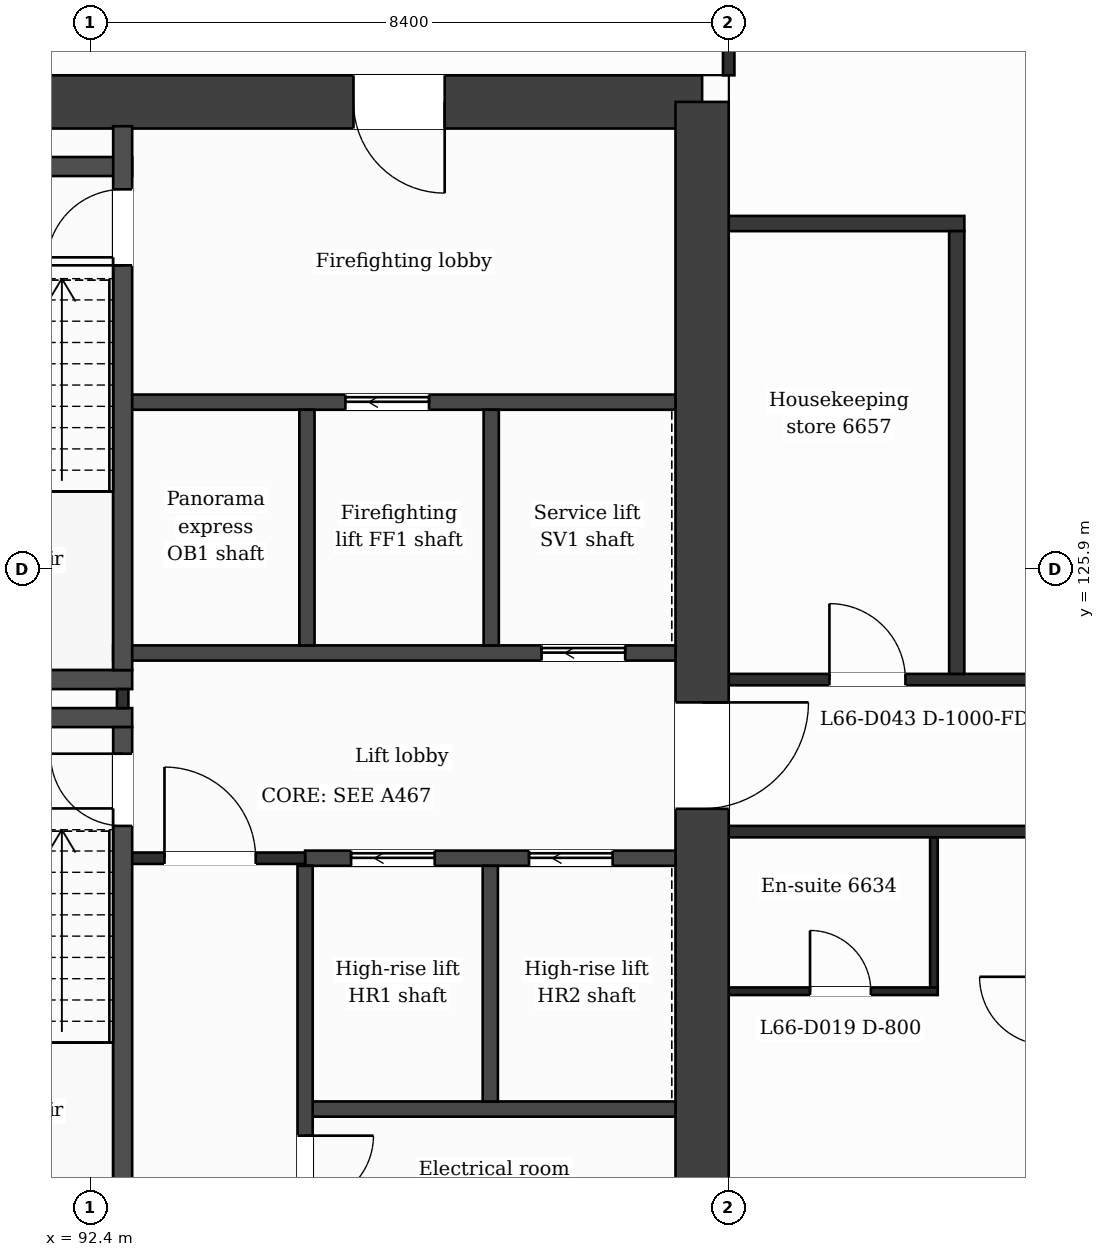
"""IFC4 building model, lengths in metres.
Left out: names, types, materials, properties, quantities, classifications, styles, units other than length and angle.
Written with IfcOpenShell. Run it as: python <this file> out.ifc"""

import sys

from ifc_helpers import new_model, si_unit, direction, frame, frame_2d, origin, place, context, subcontext, project, spatial, rectangle, extrude, element, fill, save


model = new_model("IFC4")
c1 = context("Model", 3, precision=1e-05, world=origin(), true_north=direction((0.0, 1.0)))
c2 = subcontext(c1, "Body", "Model", "MODEL_VIEW")
j1 = project(units=[si_unit("LENGTHUNIT", "METRE"), si_unit("PLANEANGLEUNIT", "RADIAN")], contexts=[c1])
p1 = place(None, origin())
s1 = spatial("IfcSite", under=j1, at=p1, CompositionType="ELEMENT")
p2 = place(p1, origin())
s2 = spatial("IfcBuilding", under=s1, at=p2, CompositionType="ELEMENT")
p3 = place(p2, frame((0.0, 0.0, 273.8)))
s3 = spatial("IfcBuildingStorey", under=s2, at=p3, CompositionType="ELEMENT", Elevation=273.8)
p4 = place(p3, frame((88.937, 132.05, 0.0), z_axis=(0.0, 0.0, 1.0), x_axis=(1.0, 0.0, 0.0)))
e1 = element("IfcWall", 1, at=p4, inside=s3, PredefinedType="SHEAR", context=c2, shape_type="SweptSolid", body=[
    extrude(rectangle(XDim=11.513, YDim=0.7, at=frame_2d((5.757, 0.0))), origin(), (0.0, 0.0, 1.0), 3.7),
])
p5 = place(p4, frame((6.927, 0.0, 0.0)))
e2 = element("IfcOpeningElement", 2, at=p5, cuts=e1, PredefinedType="OPENING", context=c2, shape_type="SweptSolid", body=[
    extrude(rectangle(XDim=1.2, YDim=2.1, at=frame_2d((0.6, 1.05))), frame((0.0, 0.36, 0.0), z_axis=(0.0, -1.0, 0.0), x_axis=(1.0, 0.0, 0.0)), (0.0, 0.0, 1.0), 0.72),
])
p6 = place(p3, frame((100.45, 132.05, 0.0), z_axis=(0.0, 0.0, 1.0), x_axis=(0.0, -1.0, 0.0)))
e3 = element("IfcWall", 3, at=p6, inside=s3, PredefinedType="SHEAR", context=c2, shape_type="SweptSolid", body=[
    extrude(rectangle(XDim=21.3, YDim=0.7, at=frame_2d((10.65, 0.0))), origin(), (0.0, 0.0, 1.0), 3.7),
])
p7 = place(p6, frame((7.9, 0.0, 0.0)))
e4 = element("IfcOpeningElement", 4, at=p7, cuts=e3, PredefinedType="OPENING", context=c2, shape_type="SweptSolid", body=[
    extrude(rectangle(XDim=1.4, YDim=2.1, at=frame_2d((0.7, 1.05))), frame((0.0, 0.36, 0.0), z_axis=(0.0, -1.0, 0.0), x_axis=(1.0, 0.0, 0.0)), (0.0, 0.0, 1.0), 0.72),
])
p8 = place(p3, frame((95.227, 118.8, 0.0), z_axis=(0.0, 0.0, 1.0), x_axis=(1.0, 0.0, 0.0)))
e5 = element("IfcWall", 5, at=p8, inside=s3, PredefinedType="PARTITIONING", context=c2, shape_type="SweptSolid", body=[
    extrude(rectangle(XDim=4.873, YDim=0.2, at=frame_2d((2.437, 0.0))), origin(), (0.0, 0.0, 1.0), 3.38),
])
p9 = place(p3, frame((100.8, 120.35, 0.0), z_axis=(0.0, 0.0, 1.0), x_axis=(1.0, 0.0, 0.0)))
e6 = element("IfcWall", 6, at=p9, inside=s3, PredefinedType="PARTITIONING", context=c2, shape_type="SweptSolid", body=[
    extrude(rectangle(XDim=2.75, YDim=0.1, at=frame_2d((1.375, 0.0))), origin(), (0.0, 0.0, 1.0), 3.38),
])
p10 = place(p9, frame((1.07, 0.0, 0.0)))
e7 = element("IfcOpeningElement", 7, at=p10, cuts=e6, PredefinedType="OPENING", context=c2, shape_type="SweptSolid", body=[
    extrude(rectangle(XDim=0.8, YDim=2.1, at=frame_2d((0.4, 1.05))), frame((0.0, 0.06, 0.0), z_axis=(0.0, -1.0, 0.0), x_axis=(1.0, 0.0, 0.0)), (0.0, 0.0, 1.0), 0.12),
])
p11 = place(p3, frame((95.227, 122.1, 0.0), z_axis=(0.0, 0.0, 1.0), x_axis=(1.0, 0.0, 0.0)))
e8 = element("IfcWall", 8, at=p11, inside=s3, PredefinedType="PARTITIONING", context=c2, shape_type="SweptSolid", body=[
    extrude(rectangle(XDim=4.873, YDim=0.2, at=frame_2d((2.437, 0.0))), origin(), (0.0, 0.0, 1.0), 3.38),
])
p12 = place(p11, frame((0.605, 0.0, 0.0)))
e9 = element("IfcOpeningElement", 9, at=p12, cuts=e8, PredefinedType="OPENING", context=c2, shape_type="SweptSolid", body=[
    extrude(rectangle(XDim=1.1, YDim=2.1, at=frame_2d((0.55, 1.05))), frame((0.0, 0.11, 0.0), z_axis=(0.0, -1.0, 0.0), x_axis=(1.0, 0.0, 0.0)), (0.0, 0.0, 1.0), 0.22),
])
p13 = place(p11, frame((2.946, 0.0, 0.0)))
e10 = element("IfcOpeningElement", 10, at=p13, cuts=e8, PredefinedType="OPENING", context=c2, shape_type="SweptSolid", body=[
    extrude(rectangle(XDim=1.1, YDim=2.1, at=frame_2d((0.55, 1.05))), frame((0.0, 0.11, 0.0), z_axis=(0.0, -1.0, 0.0), x_axis=(1.0, 0.0, 0.0)), (0.0, 0.0, 1.0), 0.22),
])
p14 = place(p3, frame((92.827, 122.1, 0.0), z_axis=(0.0, 0.0, 1.0), x_axis=(1.0, 0.0, 0.0)))
e11 = element("IfcWall", 11, at=p14, inside=s3, PredefinedType="PARTITIONING", context=c2, shape_type="SweptSolid", body=[
    extrude(rectangle(XDim=2.4, YDim=0.15, at=frame_2d((1.2, 0.0))), origin(), (0.0, 0.0, 1.0), 3.38),
])
p15 = place(p14, frame((0.55, 0.0, 0.0)))
e12 = element("IfcOpeningElement", 12, at=p15, cuts=e11, PredefinedType="OPENING", context=c2, shape_type="SweptSolid", body=[
    extrude(rectangle(XDim=1.2, YDim=2.1, at=frame_2d((0.6, 1.05))), frame((0.0, 0.085, 0.0), z_axis=(0.0, -1.0, 0.0), x_axis=(1.0, 0.0, 0.0)), (0.0, 0.0, 1.0), 0.17),
])
p16 = place(p3, frame((100.8, 122.45, 0.0), z_axis=(0.0, 0.0, 1.0), x_axis=(1.0, 0.0, 0.0)))
e13 = element("IfcWall", 13, at=p16, inside=s3, PredefinedType="PARTITIONING", context=c2, shape_type="SweptSolid", body=[
    extrude(rectangle(XDim=25.2, YDim=0.15, at=frame_2d((12.6, 0.0))), origin(), (0.0, 0.0, 1.0), 3.38),
])
p17 = place(p16, frame((5.55, 0.0, 0.0)))
e14 = element("IfcOpeningElement", 14, at=p17, cuts=e13, PredefinedType="OPENING", context=c2, shape_type="SweptSolid", body=[
    extrude(rectangle(XDim=1.0, YDim=2.1, at=frame_2d((0.5, 1.05))), frame((0.0, 0.085, 0.0), z_axis=(0.0, -1.0, 0.0), x_axis=(1.0, 0.0, 0.0)), (0.0, 0.0, 1.0), 0.17),
])
p18 = place(p16, frame((8.862, 0.0, 0.0)))
e15 = element("IfcOpeningElement", 15, at=p18, cuts=e13, PredefinedType="OPENING", context=c2, shape_type="SweptSolid", body=[
    extrude(rectangle(XDim=0.95, YDim=2.1, at=frame_2d((0.475, 1.05))), frame((0.0, 0.085, 0.0), z_axis=(0.0, -1.0, 0.0), x_axis=(1.0, 0.0, 0.0)), (0.0, 0.0, 1.0), 0.17),
])
p19 = place(p16, frame((15.2, 0.0, 0.0)))
e16 = element("IfcOpeningElement", 16, at=p19, cuts=e13, PredefinedType="OPENING", context=c2, shape_type="SweptSolid", body=[
    extrude(rectangle(XDim=0.95, YDim=2.1, at=frame_2d((0.475, 1.05))), frame((0.0, 0.085, 0.0), z_axis=(0.0, -1.0, 0.0), x_axis=(1.0, 0.0, 0.0)), (0.0, 0.0, 1.0), 0.17),
])
p20 = place(p16, frame((17.325, 0.0, 0.0)))
e17 = element("IfcOpeningElement", 17, at=p20, cuts=e13, PredefinedType="OPENING", context=c2, shape_type="SweptSolid", body=[
    extrude(rectangle(XDim=1.0, YDim=2.1, at=frame_2d((0.5, 1.05))), frame((0.0, 0.085, 0.0), z_axis=(0.0, -1.0, 0.0), x_axis=(1.0, 0.0, 0.0)), (0.0, 0.0, 1.0), 0.17),
])
p21 = place(p16, frame((23.862, 0.0, 0.0)))
e18 = element("IfcOpeningElement", 18, at=p21, cuts=e13, PredefinedType="OPENING", context=c2, shape_type="SweptSolid", body=[
    extrude(rectangle(XDim=0.95, YDim=2.1, at=frame_2d((0.475, 1.05))), frame((0.0, 0.085, 0.0), z_axis=(0.0, -1.0, 0.0), x_axis=(1.0, 0.0, 0.0)), (0.0, 0.0, 1.0), 0.17),
])
for number, where, z_axis, x_axis in (
    (19, (89.552, 123.95, 0.0), (0.0, 0.0, 1.0), (1.0, 0.0, 0.0)),
    (20, (89.552, 124.45, 0.0), (0.0, 0.0, 1.0), (1.0, 0.0, 0.0)),
):
    element("IfcWall", number, at=place(p3, frame(where, z_axis=z_axis, x_axis=x_axis)), inside=s3, PredefinedType="PARTITIONING", context=c2, shape_type="SweptSolid", body=[
        extrude(rectangle(XDim=3.4, YDim=0.25, at=frame_2d((1.7, 0.0))), origin(), (0.0, 0.0, 1.0), 3.38),
    ])
p22 = place(p3, frame((100.8, 124.45, 0.0), z_axis=(0.0, 0.0, 1.0), x_axis=(1.0, 0.0, 0.0)))
e21 = element("IfcWall", 21, at=p22, inside=s3, PredefinedType="PARTITIONING", context=c2, shape_type="SweptSolid", body=[
    extrude(rectangle(XDim=25.2, YDim=0.15, at=frame_2d((12.6, 0.0))), origin(), (0.0, 0.0, 1.0), 3.38),
])
p23 = place(p22, frame((6.125, 0.0, 0.0)))
e22 = element("IfcOpeningElement", 22, at=p23, cuts=e21, PredefinedType="OPENING", context=c2, shape_type="SweptSolid", body=[
    extrude(rectangle(XDim=1.0, YDim=2.1, at=frame_2d((0.5, 1.05))), frame((0.0, 0.085, 0.0), z_axis=(0.0, -1.0, 0.0), x_axis=(1.0, 0.0, 0.0)), (0.0, 0.0, 1.0), 0.17),
])
p24 = place(p22, frame((1.325, 0.0, 0.0)))
e23 = element("IfcOpeningElement", 23, at=p24, cuts=e21, PredefinedType="OPENING", context=c2, shape_type="SweptSolid", body=[
    extrude(rectangle(XDim=1.0, YDim=2.1, at=frame_2d((0.5, 1.05))), frame((0.0, 0.085, 0.0), z_axis=(0.0, -1.0, 0.0), x_axis=(1.0, 0.0, 0.0)), (0.0, 0.0, 1.0), 0.17),
])
p25 = place(p22, frame((11.43, 0.0, 0.0)))
e24 = element("IfcOpeningElement", 24, at=p25, cuts=e21, PredefinedType="OPENING", context=c2, shape_type="SweptSolid", body=[
    extrude(rectangle(XDim=1.0, YDim=2.1, at=frame_2d((0.5, 1.05))), frame((0.0, 0.085, 0.0), z_axis=(0.0, -1.0, 0.0), x_axis=(1.0, 0.0, 0.0)), (0.0, 0.0, 1.0), 0.17),
])
p26 = place(p22, frame((21.17, 0.0, 0.0)))
e25 = element("IfcOpeningElement", 25, at=p26, cuts=e21, PredefinedType="OPENING", context=c2, shape_type="SweptSolid", body=[
    extrude(rectangle(XDim=1.0, YDim=2.1, at=frame_2d((0.5, 1.05))), frame((0.0, 0.085, 0.0), z_axis=(0.0, -1.0, 0.0), x_axis=(1.0, 0.0, 0.0)), (0.0, 0.0, 1.0), 0.17),
])
p27 = place(p3, frame((92.702, 124.8, 0.0), z_axis=(0.0, 0.0, 1.0), x_axis=(1.0, 0.0, 0.0)))
e26 = element("IfcWall", 26, at=p27, inside=s3, PredefinedType="PARTITIONING", context=c2, shape_type="SweptSolid", body=[
    extrude(rectangle(XDim=7.398, YDim=0.2, at=frame_2d((3.699, 0.0))), origin(), (0.0, 0.0, 1.0), 3.38),
])
p28 = place(p27, frame((5.636, 0.0, 0.0)))
e27 = element("IfcOpeningElement", 27, at=p28, cuts=e26, PredefinedType="OPENING", context=c2, shape_type="SweptSolid", body=[
    extrude(rectangle(XDim=1.1, YDim=2.1, at=frame_2d((0.55, 1.05))), frame((0.0, 0.11, 0.0), z_axis=(0.0, -1.0, 0.0), x_axis=(1.0, 0.0, 0.0)), (0.0, 0.0, 1.0), 0.22),
])
p29 = place(p3, frame((92.827, 128.1, 0.0), z_axis=(0.0, 0.0, 1.0), x_axis=(1.0, 0.0, 0.0)))
e28 = element("IfcWall", 28, at=p29, inside=s3, PredefinedType="PARTITIONING", context=c2, shape_type="SweptSolid", body=[
    extrude(rectangle(XDim=7.273, YDim=0.2, at=frame_2d((3.637, 0.0))), origin(), (0.0, 0.0, 1.0), 3.38),
])
p30 = place(p29, frame((2.93, 0.0, 0.0)))
e29 = element("IfcOpeningElement", 29, at=p30, cuts=e28, PredefinedType="OPENING", context=c2, shape_type="SweptSolid", body=[
    extrude(rectangle(XDim=1.1, YDim=2.1, at=frame_2d((0.55, 1.05))), frame((0.0, 0.11, 0.0), z_axis=(0.0, -1.0, 0.0), x_axis=(1.0, 0.0, 0.0)), (0.0, 0.0, 1.0), 0.22),
])
p31 = place(p3, frame((100.8, 130.45, 0.0), z_axis=(0.0, 0.0, 1.0), x_axis=(1.0, 0.0, 0.0)))
e30 = element("IfcWall", 30, at=p31, inside=s3, PredefinedType="PARTITIONING", context=c2, shape_type="SweptSolid", body=[
    extrude(rectangle(XDim=3.1, YDim=0.2, at=frame_2d((1.55, 0.0))), origin(), (0.0, 0.0, 1.0), 3.38),
])
p32 = place(p3, frame((89.146, 131.2, 0.0), z_axis=(0.0, 0.0, 1.0), x_axis=(1.0, 0.0, 0.0)))
e31 = element("IfcWall", 31, at=p32, inside=s3, PredefinedType="PARTITIONING", context=c2, shape_type="SweptSolid", body=[
    extrude(rectangle(XDim=3.806, YDim=0.25, at=frame_2d((1.903, 0.0))), origin(), (0.0, 0.0, 1.0), 3.38),
])
p33 = place(p3, frame((92.827, 124.075, 0.0), z_axis=(0.0, 0.0, 1.0), x_axis=(0.0, 1.0, 0.0)))
e32 = element("IfcWall", 32, at=p33, inside=s3, PredefinedType="PARTITIONING", context=c2, shape_type="SweptSolid", body=[
    extrude(rectangle(XDim=0.25, YDim=0.15, at=frame_2d((0.125, 0.0))), origin(), (0.0, 0.0, 1.0), 3.38),
])
p34 = place(p3, frame((92.827, 116.67, 0.0), z_axis=(0.0, 0.0, 1.0), x_axis=(0.0, 1.0, 0.0)))
e33 = element("IfcWall", 33, at=p34, inside=s3, PredefinedType="PARTITIONING", context=c2, shape_type="SweptSolid", body=[
    extrude(rectangle(XDim=7.155, YDim=0.25, at=frame_2d((3.578, 0.0))), origin(), (0.0, 0.0, 1.0), 3.38),
])
p35 = place(p34, frame((5.855, 0.0, 0.0)))
e34 = element("IfcOpeningElement", 34, at=p35, cuts=e33, PredefinedType="OPENING", context=c2, shape_type="SweptSolid", body=[
    extrude(rectangle(XDim=0.95, YDim=2.1, at=frame_2d((0.475, 1.05))), frame((0.0, 0.135, 0.0), z_axis=(0.0, -1.0, 0.0), x_axis=(1.0, 0.0, 0.0)), (0.0, 0.0, 1.0), 0.27),
])
p36 = place(p3, frame((92.827, 124.575, 0.0), z_axis=(0.0, 0.0, 1.0), x_axis=(0.0, 1.0, 0.0)))
e35 = element("IfcWall", 35, at=p36, inside=s3, PredefinedType="PARTITIONING", context=c2, shape_type="SweptSolid", body=[
    extrude(rectangle(XDim=7.155, YDim=0.25, at=frame_2d((3.578, 0.0))), origin(), (0.0, 0.0, 1.0), 3.38),
])
p37 = place(p36, frame((5.325, 0.0, 0.0)))
e36 = element("IfcOpeningElement", 36, at=p37, cuts=e35, PredefinedType="OPENING", context=c2, shape_type="SweptSolid", body=[
    extrude(rectangle(XDim=1.0, YDim=2.1, at=frame_2d((0.5, 1.05))), frame((0.0, 0.135, 0.0), z_axis=(0.0, -1.0, 0.0), x_axis=(1.0, 0.0, 0.0)), (0.0, 0.0, 1.0), 0.27),
])
p38 = place(p3, frame((95.227, 116.67, 0.0), z_axis=(0.0, 0.0, 1.0), x_axis=(0.0, 1.0, 0.0)))
e37 = element("IfcWall", 37, at=p38, inside=s3, PredefinedType="PARTITIONING", context=c2, shape_type="SweptSolid", body=[
    extrude(rectangle(XDim=5.33, YDim=0.2, at=frame_2d((2.665, 0.0))), origin(), (0.0, 0.0, 1.0), 3.38),
])
p39 = place(p38, frame((0.88, 0.0, 0.0)))
e38 = element("IfcOpeningElement", 38, at=p39, cuts=e37, PredefinedType="OPENING", context=c2, shape_type="SweptSolid", body=[
    extrude(rectangle(XDim=0.9, YDim=2.1, at=frame_2d((0.45, 1.05))), frame((0.0, 0.11, 0.0), z_axis=(0.0, -1.0, 0.0), x_axis=(1.0, 0.0, 0.0)), (0.0, 0.0, 1.0), 0.22),
])
for number, where, z_axis, x_axis in (
    (39, (95.251, 124.9, 0.0), (0.0, 0.0, 1.0), (0.0, 1.0, 0.0)),
    (40, (97.664, 118.9, 0.0), (0.0, 0.0, 1.0), (0.0, 1.0, 0.0)),
    (41, (97.676, 124.9, 0.0), (0.0, 0.0, 1.0), (0.0, 1.0, 0.0)),
):
    element("IfcWall", number, at=place(p3, frame(where, z_axis=z_axis, x_axis=x_axis)), inside=s3, PredefinedType="PARTITIONING", context=c2, shape_type="SweptSolid", body=[
        extrude(rectangle(XDim=3.1, YDim=0.2, at=frame_2d((1.55, 0.0))), origin(), (0.0, 0.0, 1.0), 3.38),
    ])
p40 = place(p3, frame((100.8, 132.4, 0.0), z_axis=(0.0, 0.0, 1.0), x_axis=(0.0, 1.0, 0.0)))
e42 = element("IfcWall", 42, at=p40, inside=s3, PredefinedType="PARTITIONING", context=c2, shape_type="SweptSolid", body=[
    extrude(rectangle(XDim=1.325, YDim=0.15, at=frame_2d((0.663, 0.0))), origin(), (0.0, 0.0, 1.0), 3.38),
])
p41 = place(p3, frame((103.5, 120.4, 0.0), z_axis=(0.0, 0.0, 1.0), x_axis=(0.0, 1.0, 0.0)))
e43 = element("IfcWall", 43, at=p41, inside=s3, PredefinedType="PARTITIONING", context=c2, shape_type="SweptSolid", body=[
    extrude(rectangle(XDim=1.975, YDim=0.1, at=frame_2d((0.988, 0.0))), origin(), (0.0, 0.0, 1.0), 3.38),
])
p42 = place(p3, frame((103.8, 124.525, 0.0), z_axis=(0.0, 0.0, 1.0), x_axis=(0.0, 1.0, 0.0)))
e44 = element("IfcWall", 44, at=p42, inside=s3, PredefinedType="PARTITIONING", context=c2, shape_type="SweptSolid", body=[
    extrude(rectangle(XDim=5.825, YDim=0.2, at=frame_2d((2.913, 0.0))), origin(), (0.0, 0.0, 1.0), 3.38),
])
p43 = place(p15, origin())
e45 = element("IfcDoor", 45, at=p43, inside=s3, OperationType="SINGLE_SWING_LEFT", PredefinedType="DOOR", context=c2, shape_type="SweptSolid", body=[
    extrude(rectangle(XDim=1.2, YDim=2.1, at=frame_2d((0.6, 1.05))), frame((0.0, 0.025, 0.0), z_axis=(0.0, -1.0, 0.0), x_axis=(1.0, 0.0, 0.0)), (0.0, 0.0, 1.0), 0.05),
])
fill(e12, e45)
p44 = place(p12, origin())
e46 = element("IfcDoor", 46, at=p44, inside=s3, OperationType="SLIDING_TO_LEFT", PredefinedType="DOOR", context=c2, shape_type="SweptSolid", body=[
    extrude(rectangle(XDim=1.1, YDim=2.1, at=frame_2d((0.55, 1.05))), frame((0.0, 0.025, 0.0), z_axis=(0.0, -1.0, 0.0), x_axis=(1.0, 0.0, 0.0)), (0.0, 0.0, 1.0), 0.05),
])
fill(e9, e46)
p45 = place(p13, origin())
e47 = element("IfcDoor", 47, at=p45, inside=s3, OperationType="SLIDING_TO_LEFT", PredefinedType="DOOR", context=c2, shape_type="SweptSolid", body=[
    extrude(rectangle(XDim=1.1, YDim=2.1, at=frame_2d((0.55, 1.05))), frame((0.0, 0.025, 0.0), z_axis=(0.0, -1.0, 0.0), x_axis=(1.0, 0.0, 0.0)), (0.0, 0.0, 1.0), 0.05),
])
fill(e10, e47)
p46 = place(p30, origin())
e48 = element("IfcDoor", 48, at=p46, inside=s3, OperationType="SLIDING_TO_LEFT", PredefinedType="DOOR", context=c2, shape_type="SweptSolid", body=[
    extrude(rectangle(XDim=1.1, YDim=2.1, at=frame_2d((0.55, 1.05))), frame((0.0, 0.025, 0.0), z_axis=(0.0, -1.0, 0.0), x_axis=(1.0, 0.0, 0.0)), (0.0, 0.0, 1.0), 0.05),
])
fill(e29, e48)
p47 = place(p28, origin())
e49 = element("IfcDoor", 49, at=p47, inside=s3, OperationType="SLIDING_TO_LEFT", PredefinedType="DOOR", context=c2, shape_type="SweptSolid", body=[
    extrude(rectangle(XDim=1.1, YDim=2.1, at=frame_2d((0.55, 1.05))), frame((0.0, 0.025, 0.0), z_axis=(0.0, -1.0, 0.0), x_axis=(1.0, 0.0, 0.0)), (0.0, 0.0, 1.0), 0.05),
])
fill(e27, e49)
p48 = place(p35, origin())
e50 = element("IfcDoor", 50, at=p48, inside=s3, OperationType="SINGLE_SWING_RIGHT", PredefinedType="DOOR", context=c2, shape_type="SweptSolid", body=[
    extrude(rectangle(XDim=0.95, YDim=2.1, at=frame_2d((0.475, 1.05))), frame((0.0, 0.025, 0.0), z_axis=(0.0, -1.0, 0.0), x_axis=(1.0, 0.0, 0.0)), (0.0, 0.0, 1.0), 0.05),
])
fill(e34, e50)
p49 = place(p37, origin())
e51 = element("IfcDoor", 51, at=p49, inside=s3, OperationType="SINGLE_SWING_LEFT", PredefinedType="DOOR", context=c2, shape_type="SweptSolid", body=[
    extrude(rectangle(XDim=1.0, YDim=2.1, at=frame_2d((0.5, 1.05))), frame((0.0, 0.025, 0.0), z_axis=(0.0, -1.0, 0.0), x_axis=(1.0, 0.0, 0.0)), (0.0, 0.0, 1.0), 0.05),
])
fill(e36, e51)
p50 = place(p39, origin())
e52 = element("IfcDoor", 52, at=p50, inside=s3, OperationType="SINGLE_SWING_RIGHT", PredefinedType="DOOR", context=c2, shape_type="SweptSolid", body=[
    extrude(rectangle(XDim=0.9, YDim=2.1, at=frame_2d((0.45, 1.05))), frame((0.0, 0.025, 0.0), z_axis=(0.0, -1.0, 0.0), x_axis=(1.0, 0.0, 0.0)), (0.0, 0.0, 1.0), 0.05),
])
fill(e38, e52)
p51 = place(p10, origin())
e53 = element("IfcDoor", 53, at=p51, inside=s3, OperationType="SINGLE_SWING_LEFT", PredefinedType="DOOR", context=c2, shape_type="SweptSolid", body=[
    extrude(rectangle(XDim=0.8, YDim=2.1, at=frame_2d((0.4, 1.05))), frame((0.0, 0.025, 0.0), z_axis=(0.0, -1.0, 0.0), x_axis=(1.0, 0.0, 0.0)), (0.0, 0.0, 1.0), 0.05),
])
fill(e7, e53)
p52 = place(p24, origin())
e54 = element("IfcDoor", 54, at=p52, inside=s3, OperationType="SINGLE_SWING_LEFT", PredefinedType="DOOR", context=c2, shape_type="SweptSolid", body=[
    extrude(rectangle(XDim=1.0, YDim=2.1, at=frame_2d((0.5, 1.05))), frame((0.0, 0.025, 0.0), z_axis=(0.0, -1.0, 0.0), x_axis=(1.0, 0.0, 0.0)), (0.0, 0.0, 1.0), 0.05),
])
fill(e23, e54)
p53 = place(p5, origin())
e55 = element("IfcDoor", 55, at=p53, inside=s3, OperationType="SINGLE_SWING_RIGHT", PredefinedType="DOOR", context=c2, shape_type="SweptSolid", body=[
    extrude(rectangle(XDim=1.2, YDim=2.1, at=frame_2d((0.6, 1.05))), frame((0.0, 0.025, 0.0), z_axis=(0.0, -1.0, 0.0), x_axis=(1.0, 0.0, 0.0)), (0.0, 0.0, 1.0), 0.05),
])
fill(e2, e55)
p54 = place(p7, origin())
e56 = element("IfcDoor", 56, at=p54, inside=s3, OperationType="SINGLE_SWING_LEFT", PredefinedType="DOOR", context=c2, shape_type="SweptSolid", body=[
    extrude(rectangle(XDim=1.4, YDim=2.1, at=frame_2d((0.7, 1.05))), frame((0.0, 0.025, 0.0), z_axis=(0.0, -1.0, 0.0), x_axis=(1.0, 0.0, 0.0)), (0.0, 0.0, 1.0), 0.05),
])
fill(e4, e56)
save(model, sys.argv[1])
